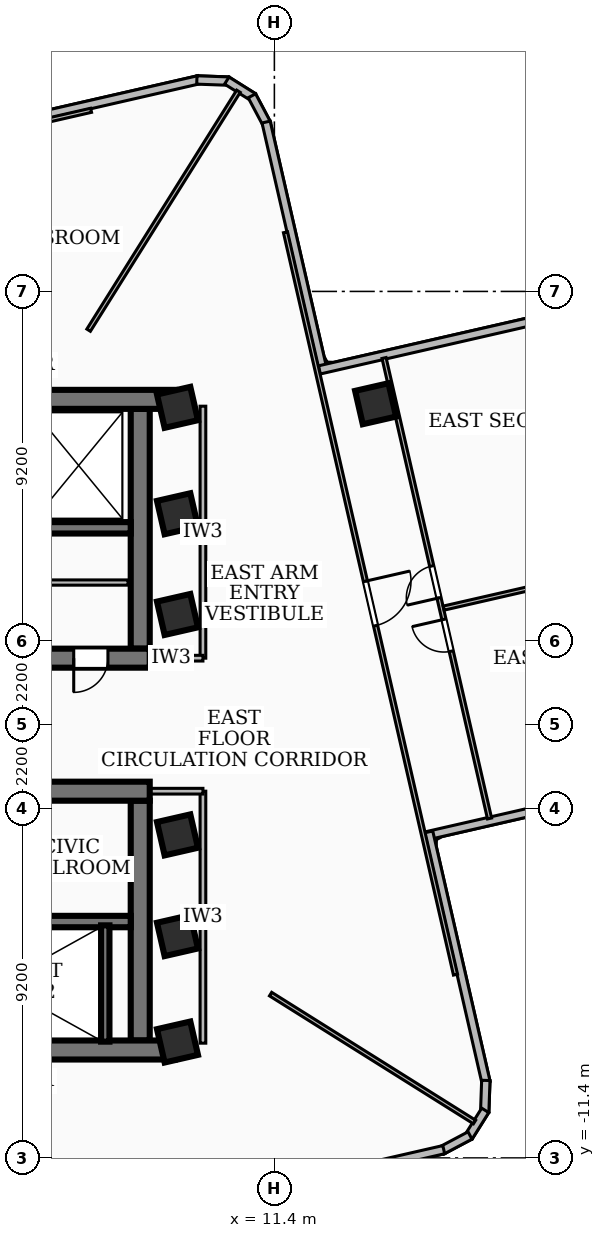
"""IFC4 building model, lengths in metres.
Left out: names, types, materials, properties, quantities, classifications, styles, units other than length and angle.
Written with IfcOpenShell. Run it as: python <this file> out.ifc"""

import sys

from ifc_helpers import new_model, si_unit, direction, frame, frame_2d, origin, origin_2d, place, context, subcontext, project, spatial, rectangle, extrude, element, fill, save


model = new_model("IFC4")
c1 = context("Model", 3, precision=1e-05, world=origin(), true_north=direction((0.0, 1.0)))
c2 = subcontext(c1, "Body", "Model", "MODEL_VIEW")
j1 = project(units=[si_unit("LENGTHUNIT", "METRE"), si_unit("PLANEANGLEUNIT", "RADIAN")], contexts=[c1])
p1 = place(None, origin())
s1 = spatial("IfcSite", under=j1, at=p1, CompositionType="ELEMENT")
p2 = place(p1, origin())
s2 = spatial("IfcBuilding", under=s1, at=p2, CompositionType="ELEMENT")
p3 = place(p2, frame((0.0, 0.0, 116.28)))
s3 = spatial("IfcBuildingStorey", under=s2, at=p3, CompositionType="ELEMENT", Elevation=116.28)
p4 = place(p3, frame((-8.78, 8.56, 0.0), z_axis=(0.0, 0.0, 1.0), x_axis=(1.0, 0.0, 0.0)))
e1 = element("IfcWall", 1, at=p4, inside=s3, PredefinedType="SHEAR", context=c2, shape_type="SweptSolid", body=[
    extrude(rectangle(XDim=17.56, YDim=0.5, at=frame_2d((8.78, 0.0))), origin(), (0.0, 0.0, 1.0), 3.34),
])
p5 = place(p3, frame((8.12, 1.75, 0.0), z_axis=(0.0, 0.0, 1.0), x_axis=(-1.0, 0.0, 0.0)))
e2 = element("IfcWall", 2, at=p5, inside=s3, PredefinedType="SHEAR", context=c2, shape_type="SweptSolid", body=[
    extrude(rectangle(XDim=16.24, YDim=0.5, at=frame_2d((8.12, 0.0))), origin(), (0.0, 0.0, 1.0), 3.34),
])
p6 = place(p5, frame((7.45, 0.0, 0.0)))
e3 = element("IfcOpeningElement", 3, at=p6, cuts=e2, PredefinedType="OPENING", context=c2, shape_type="SweptSolid", body=[
    extrude(rectangle(XDim=1.0, YDim=2.1, at=frame_2d((0.5, 1.05))), frame((0.0, 0.26, 0.0), z_axis=(0.0, -1.0, 0.0), x_axis=(1.0, 0.0, 0.0)), (0.0, 0.0, 1.0), 0.52),
])
p7 = place(p5, frame((3.4, 0.0, 0.0)))
e4 = element("IfcOpeningElement", 4, at=p7, cuts=e2, PredefinedType="OPENING", context=c2, shape_type="SweptSolid", body=[
    extrude(rectangle(XDim=0.9, YDim=2.06, at=frame_2d((0.45, 1.03))), frame((0.0, 0.26, 0.0), z_axis=(0.0, -1.0, 0.0), x_axis=(1.0, 0.0, 0.0)), (0.0, 0.0, 1.0), 0.52),
])
p8 = place(p5, frame((1.1, 0.0, 0.0)))
e5 = element("IfcOpeningElement", 5, at=p8, cuts=e2, PredefinedType="OPENING", context=c2, shape_type="SweptSolid", body=[
    extrude(rectangle(XDim=0.9, YDim=2.06, at=frame_2d((0.45, 1.03))), frame((0.0, 0.26, 0.0), z_axis=(0.0, -1.0, 0.0), x_axis=(1.0, 0.0, 0.0)), (0.0, 0.0, 1.0), 0.52),
])
p9 = place(p3, frame((7.87, 8.31, 0.0), z_axis=(0.0, 0.0, 1.0), x_axis=(0.0, -1.0, 0.0)))
e6 = element("IfcWall", 6, at=p9, inside=s3, PredefinedType="SHEAR", context=c2, shape_type="SweptSolid", body=[
    extrude(rectangle(XDim=6.31, YDim=0.5, at=frame_2d((3.155, 0.0))), origin(), (0.0, 0.0, 1.0), 3.34),
])
p10 = place(p3, frame((7.62, 5.18, 0.0), z_axis=(0.0, 0.0, 1.0), x_axis=(-1.0, 0.0, 0.0)))
e7 = element("IfcWall", 7, at=p10, inside=s3, PredefinedType="SOLIDWALL", context=c2, shape_type="SweptSolid", body=[
    extrude(rectangle(XDim=15.24, YDim=0.3, at=frame_2d((7.62, 0.0))), origin(), (0.0, 0.0, 1.0), 3.34),
])
p11 = place(p10, frame((5.77, 0.0, 0.0)))
e8 = element("IfcOpeningElement", 8, at=p11, cuts=e7, PredefinedType="OPENING", context=c2, shape_type="SweptSolid", body=[
    extrude(rectangle(XDim=1.1, YDim=2.15, at=frame_2d((0.55, 1.075))), frame((0.0, 0.16, 0.0), z_axis=(0.0, -1.0, 0.0), x_axis=(1.0, 0.0, 0.0)), (0.0, 0.0, 1.0), 0.32),
])
p12 = place(p10, frame((2.97, 0.0, 0.0)))
e9 = element("IfcOpeningElement", 9, at=p12, cuts=e7, PredefinedType="OPENING", context=c2, shape_type="SweptSolid", body=[
    extrude(rectangle(XDim=1.1, YDim=2.15, at=frame_2d((0.55, 1.075))), frame((0.0, 0.16, 0.0), z_axis=(0.0, -1.0, 0.0), x_axis=(1.0, 0.0, 0.0)), (0.0, 0.0, 1.0), 0.32),
])
p13 = place(p10, frame((7.97, 0.0, 0.0)))
e10 = element("IfcOpeningElement", 10, at=p13, cuts=e7, PredefinedType="OPENING", context=c2, shape_type="SweptSolid", body=[
    extrude(rectangle(XDim=1.0, YDim=2.1, at=frame_2d((0.5, 1.05))), frame((0.0, 0.16, 0.0), z_axis=(0.0, -1.0, 0.0), x_axis=(1.0, 0.0, 0.0)), (0.0, 0.0, 1.0), 0.32),
])
p14 = place(p3, frame((8.78, -8.56, 0.0), z_axis=(0.0, 0.0, 1.0), x_axis=(-1.0, 0.0, 0.0)))
e11 = element("IfcWall", 11, at=p14, inside=s3, PredefinedType="SHEAR", context=c2, shape_type="SweptSolid", body=[
    extrude(rectangle(XDim=17.56, YDim=0.5, at=frame_2d((8.78, 0.0))), origin(), (0.0, 0.0, 1.0), 3.34),
])
p15 = place(p3, frame((-8.12, -1.75, 0.0), z_axis=(0.0, 0.0, 1.0), x_axis=(1.0, 0.0, 0.0)))
e12 = element("IfcWall", 12, at=p15, inside=s3, PredefinedType="SHEAR", context=c2, shape_type="SweptSolid", body=[
    extrude(rectangle(XDim=16.24, YDim=0.5, at=frame_2d((8.12, 0.0))), origin(), (0.0, 0.0, 1.0), 3.34),
])
p16 = place(p15, frame((7.45, 0.0, 0.0)))
e13 = element("IfcOpeningElement", 13, at=p16, cuts=e12, PredefinedType="OPENING", context=c2, shape_type="SweptSolid", body=[
    extrude(rectangle(XDim=1.0, YDim=2.1, at=frame_2d((0.5, 1.05))), frame((0.0, 0.26, 0.0), z_axis=(0.0, -1.0, 0.0), x_axis=(1.0, 0.0, 0.0)), (0.0, 0.0, 1.0), 0.52),
])
p17 = place(p15, frame((12.65, 0.0, 0.0)))
e14 = element("IfcOpeningElement", 14, at=p17, cuts=e12, PredefinedType="OPENING", context=c2, shape_type="SweptSolid", body=[
    extrude(rectangle(XDim=0.9, YDim=2.06, at=frame_2d((0.45, 1.03))), frame((0.0, 0.26, 0.0), z_axis=(0.0, -1.0, 0.0), x_axis=(1.0, 0.0, 0.0)), (0.0, 0.0, 1.0), 0.52),
])
p18 = place(p15, frame((0.565, 0.0, 0.0)))
e15 = element("IfcOpeningElement", 15, at=p18, cuts=e12, PredefinedType="OPENING", context=c2, shape_type="SweptSolid", body=[
    extrude(rectangle(XDim=1.05, YDim=2.15, at=frame_2d((0.525, 1.075))), frame((0.0, 0.26, 0.0), z_axis=(0.0, -1.0, 0.0), x_axis=(1.0, 0.0, 0.0)), (0.0, 0.0, 1.0), 0.52),
])
p19 = place(p15, frame((2.125, 0.0, 0.0)))
e16 = element("IfcOpeningElement", 16, at=p19, cuts=e12, PredefinedType="OPENING", context=c2, shape_type="SweptSolid", body=[
    extrude(rectangle(XDim=1.05, YDim=2.15, at=frame_2d((0.525, 1.075))), frame((0.0, 0.26, 0.0), z_axis=(0.0, -1.0, 0.0), x_axis=(1.0, 0.0, 0.0)), (0.0, 0.0, 1.0), 0.52),
])
p20 = place(p15, frame((3.685, 0.0, 0.0)))
e17 = element("IfcOpeningElement", 17, at=p20, cuts=e12, PredefinedType="OPENING", context=c2, shape_type="SweptSolid", body=[
    extrude(rectangle(XDim=1.05, YDim=2.15, at=frame_2d((0.525, 1.075))), frame((0.0, 0.26, 0.0), z_axis=(0.0, -1.0, 0.0), x_axis=(1.0, 0.0, 0.0)), (0.0, 0.0, 1.0), 0.52),
])
p21 = place(p3, frame((7.87, -2.0, 0.0), z_axis=(0.0, 0.0, 1.0), x_axis=(0.0, -1.0, 0.0)))
e18 = element("IfcWall", 18, at=p21, inside=s3, PredefinedType="SHEAR", context=c2, shape_type="SweptSolid", body=[
    extrude(rectangle(XDim=6.31, YDim=0.5, at=frame_2d((3.155, 0.0))), origin(), (0.0, 0.0, 1.0), 3.34),
])
p22 = place(p3, frame((-7.62, -5.18, 0.0), z_axis=(0.0, 0.0, 1.0), x_axis=(1.0, 0.0, 0.0)))
e19 = element("IfcWall", 19, at=p22, inside=s3, PredefinedType="SOLIDWALL", context=c2, shape_type="SweptSolid", body=[
    extrude(rectangle(XDim=15.24, YDim=0.3, at=frame_2d((7.62, 0.0))), origin(), (0.0, 0.0, 1.0), 3.34),
])
p23 = place(p22, frame((5.77, 0.0, 0.0)))
e20 = element("IfcOpeningElement", 20, at=p23, cuts=e19, PredefinedType="OPENING", context=c2, shape_type="SweptSolid", body=[
    extrude(rectangle(XDim=1.1, YDim=2.15, at=frame_2d((0.55, 1.075))), frame((0.0, 0.16, 0.0), z_axis=(0.0, -1.0, 0.0), x_axis=(1.0, 0.0, 0.0)), (0.0, 0.0, 1.0), 0.32),
])
p24 = place(p22, frame((7.97, 0.0, 0.0)))
e21 = element("IfcOpeningElement", 21, at=p24, cuts=e19, PredefinedType="OPENING", context=c2, shape_type="SweptSolid", body=[
    extrude(rectangle(XDim=1.0, YDim=2.1, at=frame_2d((0.5, 1.05))), frame((0.0, 0.16, 0.0), z_axis=(0.0, -1.0, 0.0), x_axis=(1.0, 0.0, 0.0)), (0.0, 0.0, 1.0), 0.32),
])
p25 = place(p3, frame((6.95, -8.34, 0.0), z_axis=(0.0, 0.0, 1.0), x_axis=(0.0, 1.0, 0.0)))
e22 = element("IfcWall", 22, at=p25, inside=s3, PredefinedType="SOLIDWALL", context=c2, shape_type="SweptSolid", body=[
    extrude(rectangle(XDim=3.06, YDim=0.22, at=frame_2d((1.53, 0.0))), origin(), (0.0, 0.0, 1.0), 3.34),
])
for number, where, z_axis, x_axis in (
    (23, (8.85, -5.55, 0.0), (0.0, 0.0, 1.0), (0.975, 0.223, 0.0)),
    (24, (8.85, -2.9, 0.0), (0.0, 0.0, 1.0), (0.975, 0.223, 0.0)),
    (25, (8.85, 2.9, 0.0), (0.0, 0.0, 1.0), (0.975, 0.223, 0.0)),
    (26, (8.85, 5.55, 0.0), (0.0, 0.0, 1.0), (0.975, 0.223, 0.0)),
    (27, (8.85, -8.35, 0.0), (0.0, 0.0, 1.0), (0.975, 0.223, 0.0)),
    (28, (8.85, 8.35, 0.0), (0.0, 0.0, 1.0), (0.975, 0.223, 0.0)),
    (29, (14.064, 8.445, 0.0), (0.0, 0.0, 1.0), (0.975, 0.223, 0.0)),
):
    element("IfcColumn", number, at=place(p3, frame(where, z_axis=z_axis, x_axis=x_axis)), inside=s3, PredefinedType="COLUMN", context=c2, shape_type="SweptSolid", body=[
        extrude(rectangle(XDim=0.9, YDim=0.9, at=origin_2d()), origin(), (0.0, 0.0, 1.0), 3.6),
    ])
p26 = place(p3, frame((2.821, 15.46, 0.0), z_axis=(0.0, 0.0, 1.0), x_axis=(0.974754598481, 0.223278912438, 0.0)))
e30 = element("IfcWall", 30, at=p26, inside=s3, PredefinedType="SOLIDWALL", context=c2, shape_type="SweptSolid", body=[
    extrude(rectangle(XDim=6.759, YDim=0.22, at=frame_2d((3.379, 0.0))), origin(), (0.0, 0.0, 1.0), 2.57),
])
p27 = place(p3, frame((9.36, 16.964, 0.0), z_axis=(0.0, 0.0, 1.0), x_axis=(0.999352376715, -0.035983706773, 0.0)))
e31 = element("IfcWall", 31, at=p27, inside=s3, PredefinedType="SOLIDWALL", context=c2, shape_type="SweptSolid", body=[
    extrude(rectangle(XDim=0.834, YDim=0.22, at=frame_2d((0.417, 0.0))), origin(), (0.0, 0.0, 1.0), 3.34),
])
p28 = place(p3, frame((10.148, 16.948, 0.0), z_axis=(0.0, 0.0, 1.0), x_axis=(0.847311109497, -0.531096868492, 0.0)))
e32 = element("IfcWall", 32, at=p28, inside=s3, PredefinedType="SOLIDWALL", context=c2, shape_type="SweptSolid", body=[
    extrude(rectangle(XDim=0.819, YDim=0.22, at=frame_2d((0.41, 0.0))), origin(), (0.0, 0.0, 1.0), 3.34),
])
p29 = place(p3, frame((10.809, 16.548, 0.0), z_axis=(0.0, 0.0, 1.0), x_axis=(0.468506090516, -0.883460266876, 0.0)))
e33 = element("IfcWall", 33, at=p29, inside=s3, PredefinedType="SOLIDWALL", context=c2, shape_type="SweptSolid", body=[
    extrude(rectangle(XDim=0.834, YDim=0.22, at=frame_2d((0.417, 0.0))), origin(), (0.0, 0.0, 1.0), 3.34),
])
p30 = place(p3, frame((11.182, 15.857, 0.0), z_axis=(0.0, 0.0, 1.0), x_axis=(0.223278912438, -0.974754598481, 0.0)))
e34 = element("IfcWall", 34, at=p30, inside=s3, PredefinedType="SOLIDWALL", context=c2, shape_type="SweptSolid", body=[
    extrude(rectangle(XDim=6.759, YDim=0.22, at=frame_2d((3.379, 0.0))), origin(), (0.0, 0.0, 1.0), 3.34),
])
p31 = place(p3, frame((12.585, 9.335, 0.0), z_axis=(0.0, 0.0, 1.0), x_axis=(0.974754036658, 0.223281365141, 0.0)))
e35 = element("IfcWall", 35, at=p31, inside=s3, PredefinedType="SOLIDWALL", context=c2, shape_type="SweptSolid", body=[
    extrude(rectangle(XDim=13.459, YDim=0.22, at=frame_2d((6.729, 0.0))), origin(), (0.0, 0.0, 1.0), 3.34),
])
p32 = place(p31, frame((10.559, 0.0, 0.85)))
e36 = element("IfcOpeningElement", 36, at=p32, cuts=e35, PredefinedType="OPENING", context=c2, shape_type="SweptSolid", body=[
    extrude(rectangle(XDim=1.8, YDim=1.6, at=frame_2d((0.9, 0.8))), frame((0.0, 0.12, 0.0), z_axis=(0.0, -1.0, 0.0), x_axis=(1.0, 0.0, 0.0)), (0.0, 0.0, 1.0), 0.24),
])
p33 = place(p3, frame((28.512, 0.078, 0.0), z_axis=(0.0, 0.0, 1.0), x_axis=(-0.974753462872, -0.223283870038, 0.0)))
e37 = element("IfcWall", 37, at=p33, inside=s3, PredefinedType="SOLIDWALL", context=c2, shape_type="SweptSolid", body=[
    extrude(rectangle(XDim=13.458, YDim=0.22, at=frame_2d((6.729, 0.0))), origin(), (0.0, 0.0, 1.0), 3.34),
])
p34 = place(p33, frame((1.1, 0.0, 0.85)))
e38 = element("IfcOpeningElement", 38, at=p34, cuts=e37, PredefinedType="OPENING", context=c2, shape_type="SweptSolid", body=[
    extrude(rectangle(XDim=2.4, YDim=1.85, at=frame_2d((1.2, 0.925))), frame((0.0, 0.12, 0.0), z_axis=(0.0, -1.0, 0.0), x_axis=(1.0, 0.0, 0.0)), (0.0, 0.0, 1.0), 0.24),
])
p35 = place(p3, frame((15.46, -2.821, 0.0), z_axis=(0.0, 0.0, 1.0), x_axis=(0.223278912438, -0.974754598481, 0.0)))
e39 = element("IfcWall", 39, at=p35, inside=s3, PredefinedType="SOLIDWALL", context=c2, shape_type="SweptSolid", body=[
    extrude(rectangle(XDim=6.759, YDim=0.22, at=frame_2d((3.379, 0.0))), origin(), (0.0, 0.0, 1.0), 3.34),
])
p36 = place(p3, frame((16.964, -9.36, 0.0), z_axis=(0.0, 0.0, 1.0), x_axis=(-0.035983706773, -0.999352376715, 0.0)))
e40 = element("IfcWall", 40, at=p36, inside=s3, PredefinedType="SOLIDWALL", context=c2, shape_type="SweptSolid", body=[
    extrude(rectangle(XDim=0.834, YDim=0.22, at=frame_2d((0.417, 0.0))), origin(), (0.0, 0.0, 1.0), 3.34),
])
p37 = place(p3, frame((16.948, -10.148, 0.0), z_axis=(0.0, 0.0, 1.0), x_axis=(-0.531096868492, -0.847311109497, 0.0)))
e41 = element("IfcWall", 41, at=p37, inside=s3, PredefinedType="SOLIDWALL", context=c2, shape_type="SweptSolid", body=[
    extrude(rectangle(XDim=0.819, YDim=0.22, at=frame_2d((0.41, 0.0))), origin(), (0.0, 0.0, 1.0), 3.34),
])
p38 = place(p3, frame((16.548, -10.809, 0.0), z_axis=(0.0, 0.0, 1.0), x_axis=(-0.883460266876, -0.468506090516, 0.0)))
e42 = element("IfcWall", 42, at=p38, inside=s3, PredefinedType="SOLIDWALL", context=c2, shape_type="SweptSolid", body=[
    extrude(rectangle(XDim=0.834, YDim=0.22, at=frame_2d((0.417, 0.0))), origin(), (0.0, 0.0, 1.0), 3.34),
])
p39 = place(p3, frame((15.857, -11.182, 0.0), z_axis=(0.0, 0.0, 1.0), x_axis=(-0.974754598481, -0.223278912438, 0.0)))
e43 = element("IfcWall", 43, at=p39, inside=s3, PredefinedType="SOLIDWALL", context=c2, shape_type="SweptSolid", body=[
    extrude(rectangle(XDim=6.759, YDim=0.22, at=frame_2d((3.379, 0.0))), origin(), (0.0, 0.0, 1.0), 3.34),
])
p40 = place(p3, frame((2.9, 3.74, 0.0), z_axis=(0.0, 0.0, 1.0), x_axis=(1.0, 0.0, 0.0)))
e44 = element("IfcWall", 44, at=p40, inside=s3, PredefinedType="PARTITIONING", context=c2, shape_type="SweptSolid", body=[
    extrude(rectangle(XDim=4.65, YDim=0.138, at=frame_2d((2.325, 0.0))), origin(), (0.0, 0.0, 1.0), 3.34),
])
p41 = place(p3, frame((9.52, 1.75, 0.0), z_axis=(0.0, 0.0, 1.0), x_axis=(0.0, 1.0, 0.0)))
e45 = element("IfcWall", 45, at=p41, inside=s3, PredefinedType="PARTITIONING", context=c2, shape_type="SweptSolid", body=[
    extrude(rectangle(XDim=6.63, YDim=0.15, at=frame_2d((3.315, 0.0))), origin(), (0.0, 0.0, 1.0), 2.57),
])
p42 = place(p3, frame((7.85, 1.75, 0.0), z_axis=(0.0, 0.0, 1.0), x_axis=(1.0, 0.0, 0.0)))
e46 = element("IfcWall", 46, at=p42, inside=s3, PredefinedType="PARTITIONING", context=c2, shape_type="SweptSolid", body=[
    extrude(rectangle(XDim=1.67, YDim=0.15, at=frame_2d((0.835, 0.0))), origin(), (0.0, 0.0, 1.0), 2.57),
])
p43 = place(p3, frame((9.52, -8.38, 0.0), z_axis=(0.0, 0.0, 1.0), x_axis=(0.0, 1.0, 0.0)))
e47 = element("IfcWall", 47, at=p43, inside=s3, PredefinedType="PARTITIONING", context=c2, shape_type="SweptSolid", body=[
    extrude(rectangle(XDim=6.63, YDim=0.15, at=frame_2d((3.315, 0.0))), origin(), (0.0, 0.0, 1.0), 2.57),
])
p44 = place(p3, frame((7.85, -1.75, 0.0), z_axis=(0.0, 0.0, 1.0), x_axis=(1.0, 0.0, 0.0)))
e48 = element("IfcWall", 48, at=p44, inside=s3, PredefinedType="PARTITIONING", context=c2, shape_type="SweptSolid", body=[
    extrude(rectangle(XDim=1.67, YDim=0.15, at=frame_2d((0.835, 0.0))), origin(), (0.0, 0.0, 1.0), 2.57),
])
p45 = place(p3, frame((6.512, 10.38, 0.0), z_axis=(0.0, 0.0, 1.0), x_axis=(0.531323053356, 0.847169294163, 0.0)))
e49 = element("IfcWall", 49, at=p45, inside=s3, PredefinedType="PARTITIONING", context=c2, shape_type="SweptSolid", body=[
    extrude(rectangle(XDim=7.421, YDim=0.11, at=frame_2d((3.711, 0.0))), origin(), (0.0, 0.0, 1.0), 2.57),
])
p46 = place(p3, frame((11.3, -7.089, 0.0), z_axis=(0.0, 0.0, 1.0), x_axis=(0.847172398776, -0.531318103167, 0.0)))
e50 = element("IfcWall", 50, at=p46, inside=s3, PredefinedType="PARTITIONING", context=c2, shape_type="SweptSolid", body=[
    extrude(rectangle(XDim=6.335, YDim=0.11, at=frame_2d((3.167, 0.0))), origin(), (0.0, 0.0, 1.0), 3.34),
])
p47 = place(p3, frame((11.692, 12.957, 0.0), z_axis=(0.0, 0.0, 1.0), x_axis=(0.223262093598, -0.97475845088, 0.0)))
e51 = element("IfcWall", 51, at=p47, inside=s3, PredefinedType="PARTITIONING", context=c2, shape_type="SweptSolid", body=[
    extrude(rectangle(XDim=20.04, YDim=0.11, at=frame_2d((10.02, 0.0))), origin(), (0.0, 0.0, 1.0), 2.57),
])
p48 = place(p47, frame((9.42, 0.0, 0.0)))
e52 = element("IfcOpeningElement", 52, at=p48, cuts=e51, PredefinedType="OPENING", context=c2, shape_type="SweptSolid", body=[
    extrude(rectangle(XDim=1.2, YDim=2.1, at=frame_2d((0.6, 1.05))), frame((0.0, 0.065, 0.0), z_axis=(0.0, -1.0, 0.0), x_axis=(1.0, 0.0, 0.0)), (0.0, 0.0, 1.0), 0.13),
])
p49 = place(p3, frame((15.855, 3.067, 0.0), z_axis=(0.0, 0.0, 1.0), x_axis=(0.974758398925, 0.223262320434, 0.0)))
e53 = element("IfcWall", 53, at=p49, inside=s3, PredefinedType="PARTITIONING", context=c2, shape_type="SweptSolid", body=[
    extrude(rectangle(XDim=13.075, YDim=0.11, at=frame_2d((6.538, 0.0))), origin(), (0.0, 0.0, 1.0), 2.72),
])
p50 = place(p3, frame((17.062, -2.468, 0.0), z_axis=(0.0, 0.0, 1.0), x_axis=(-0.223341555051, 0.974740247341, 0.0)))
e54 = element("IfcWall", 54, at=p50, inside=s3, PredefinedType="PARTITIONING", context=c2, shape_type="SweptSolid", body=[
    extrude(rectangle(XDim=12.43, YDim=0.11, at=frame_2d((6.215, 0.0))), origin(), (0.0, 0.0, 1.0), 2.57),
])
p51 = place(p50, frame((4.515, 0.0, 0.0)))
e55 = element("IfcOpeningElement", 55, at=p51, cuts=e54, PredefinedType="OPENING", context=c2, shape_type="SweptSolid", body=[
    extrude(rectangle(XDim=0.86, YDim=2.04, at=frame_2d((0.43, 1.02))), frame((0.0, 0.065, 0.0), z_axis=(0.0, -1.0, 0.0), x_axis=(1.0, 0.0, 0.0)), (0.0, 0.0, 1.0), 0.13),
])
p52 = place(p50, frame((5.955, 0.0, 0.0)))
e56 = element("IfcOpeningElement", 56, at=p52, cuts=e54, PredefinedType="OPENING", context=c2, shape_type="SweptSolid", body=[
    extrude(rectangle(XDim=0.86, YDim=2.04, at=frame_2d((0.43, 1.02))), frame((0.0, 0.065, 0.0), z_axis=(0.0, -1.0, 0.0), x_axis=(1.0, 0.0, 0.0)), (0.0, 0.0, 1.0), 0.13),
])
p53 = place(p3, frame((-12.957, 11.692, 0.0), z_axis=(0.0, 0.0, 1.0), x_axis=(0.97475845088, 0.223262093598, 0.0)))
e57 = element("IfcWall", 57, at=p53, inside=s3, PredefinedType="PARTITIONING", context=c2, shape_type="SweptSolid", body=[
    extrude(rectangle(XDim=20.04, YDim=0.11, at=frame_2d((10.02, 0.0))), origin(), (0.0, 0.0, 1.0), 2.57),
])
p54 = place(p53, frame((9.42, 0.0, 0.0)))
e58 = element("IfcOpeningElement", 58, at=p54, cuts=e57, PredefinedType="OPENING", context=c2, shape_type="SweptSolid", body=[
    extrude(rectangle(XDim=1.2, YDim=2.1, at=frame_2d((0.6, 1.05))), frame((0.0, 0.065, 0.0), z_axis=(0.0, -1.0, 0.0), x_axis=(1.0, 0.0, 0.0)), (0.0, 0.0, 1.0), 0.13),
])
p55 = place(p8, origin())
e59 = element("IfcDoor", 59, at=p55, inside=s3, OperationType="SINGLE_SWING_RIGHT", PredefinedType="DOOR", context=c2, shape_type="SweptSolid", body=[
    extrude(rectangle(XDim=0.9, YDim=2.06, at=frame_2d((0.45, 1.03))), frame((0.0, 0.025, 0.0), z_axis=(0.0, -1.0, 0.0), x_axis=(1.0, 0.0, 0.0)), (0.0, 0.0, 1.0), 0.05),
])
fill(e5, e59)
p56 = place(p48, origin())
e60 = element("IfcDoor", 60, at=p56, inside=s3, OperationType="SINGLE_SWING_LEFT", PredefinedType="DOOR", context=c2, shape_type="SweptSolid", body=[
    extrude(rectangle(XDim=1.2, YDim=2.1, at=frame_2d((0.6, 1.05))), frame((0.0, 0.025, 0.0), z_axis=(0.0, -1.0, 0.0), x_axis=(1.0, 0.0, 0.0)), (0.0, 0.0, 1.0), 0.05),
])
fill(e52, e60)
p57 = place(p51, origin())
e61 = element("IfcDoor", 61, at=p57, inside=s3, OperationType="SINGLE_SWING_RIGHT", PredefinedType="DOOR", context=c2, shape_type="SweptSolid", body=[
    extrude(rectangle(XDim=0.86, YDim=2.04, at=frame_2d((0.43, 1.02))), frame((0.0, 0.025, 0.0), z_axis=(0.0, -1.0, 0.0), x_axis=(1.0, 0.0, 0.0)), (0.0, 0.0, 1.0), 0.05),
])
fill(e55, e61)
p58 = place(p52, origin())
e62 = element("IfcDoor", 62, at=p58, inside=s3, OperationType="SINGLE_SWING_LEFT", PredefinedType="DOOR", context=c2, shape_type="SweptSolid", body=[
    extrude(rectangle(XDim=0.86, YDim=2.04, at=frame_2d((0.43, 1.02))), frame((0.0, 0.025, 0.0), z_axis=(0.0, -1.0, 0.0), x_axis=(1.0, 0.0, 0.0)), (0.0, 0.0, 1.0), 0.05),
])
fill(e56, e62)
save(model, sys.argv[1])
